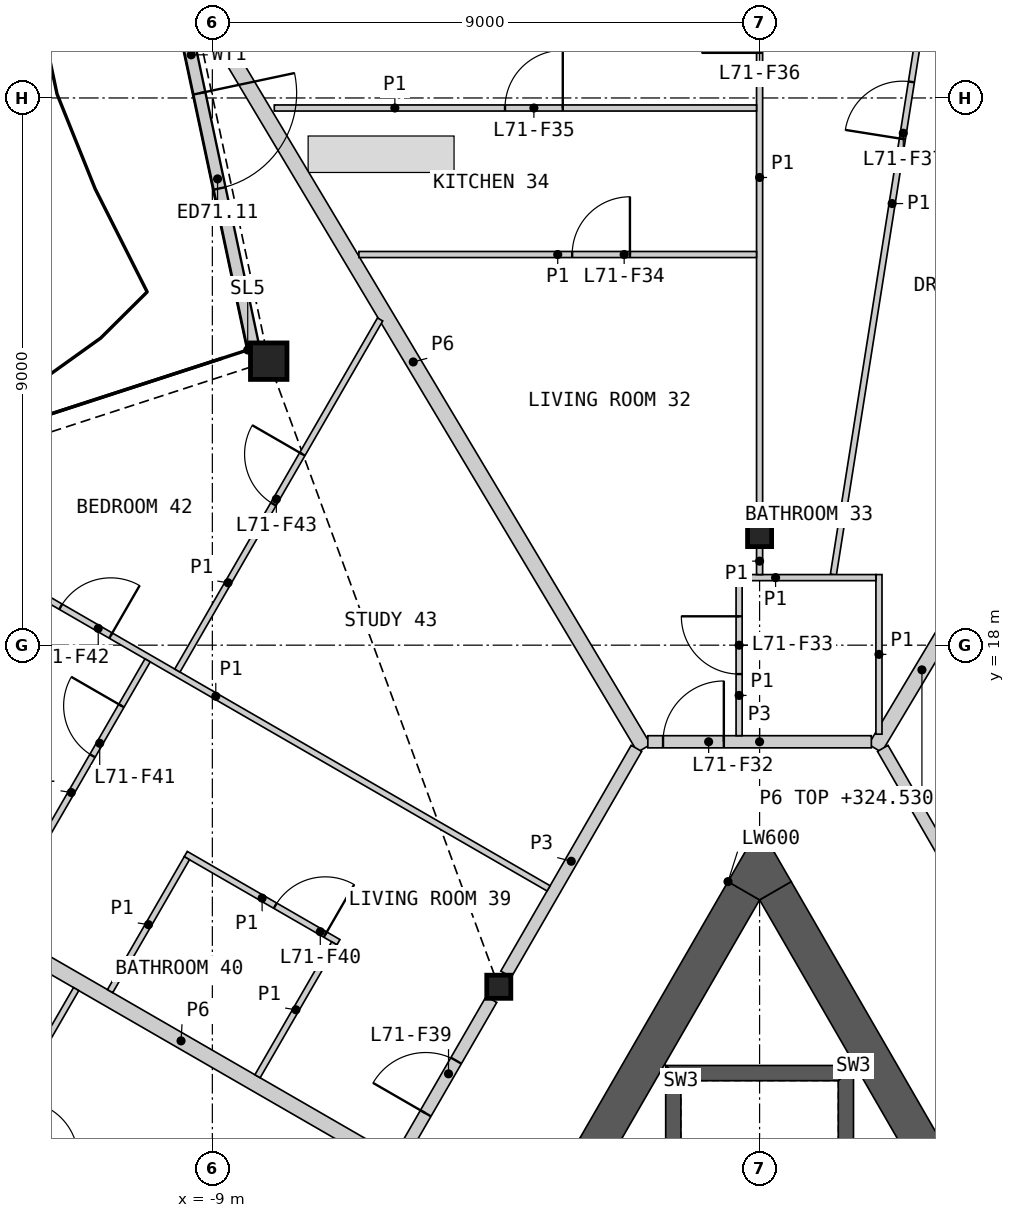
"""IFC4 building model, lengths in metres.
Left out: names, types, materials, properties, quantities, classifications, styles, units other than length and angle.
Written with IfcOpenShell. Run it as: python <this file> out.ifc"""

import sys

from ifc_helpers import new_model, si_unit, direction, frame, frame_2d, origin, origin_2d, place, context, subcontext, project, spatial, polyline, rectangle, hollow_rectangle, i_section, outline, extrude, element, fill, save


model = new_model("IFC4")
c1 = context("Model", 3, precision=1e-05, world=origin(), true_north=direction((0.0, 1.0)))
c2 = subcontext(c1, "Body", "Model", "MODEL_VIEW")
j1 = project(units=[si_unit("LENGTHUNIT", "METRE"), si_unit("PLANEANGLEUNIT", "RADIAN")], contexts=[c1])
p1 = place(None, origin())
s1 = spatial("IfcSite", under=j1, at=p1, CompositionType="ELEMENT")
p2 = place(p1, origin())
s2 = spatial("IfcBuilding", under=s1, at=p2, CompositionType="ELEMENT")
p3 = place(p2, frame((0.0, 0.0, 322.2)))
s3 = spatial("IfcBuildingStorey", under=s2, at=p3, CompositionType="ELEMENT", Elevation=322.2)
p4 = place(p3, frame((-8.073, 22.671, 0.0), z_axis=(0.0, 0.0, 1.0), x_axis=(1.0, 0.0, 0.0)))
e1 = element("IfcColumn", 1, at=p4, inside=s3, PredefinedType="COLUMN", context=c2, shape_type="SweptSolid", body=[
    extrude(hollow_rectangle(XDim=0.6, YDim=0.6, WallThickness=0.04, at=origin_2d()), origin(), (0.0, 0.0, 1.0), 3.4),
])
for number, where, z_axis, x_axis in (
    (2, (0.0, 19.811, 0.0), (0.0, 0.0, 1.0), (1.0, 0.0, 0.0)),
    (3, (-4.289, 12.382, 0.0), (0.0, 0.0, 1.0), (1.0, 0.0, 0.0)),
):
    element("IfcColumn", number, at=place(p3, frame(where, z_axis=z_axis, x_axis=x_axis)), inside=s3, PredefinedType="COLUMN", context=c2, shape_type="SweptSolid", body=[
        extrude(i_section(OverallWidth=0.396, OverallDepth=0.381, WebThickness=0.019, FlangeThickness=0.03, at=origin_2d()), origin(), (0.0, 0.0, 1.0), 3.4),
    ])
p5 = place(p3, frame((-9.684, 29.289, 0.0), z_axis=(0.0, 0.0, 1.0), x_axis=(0.207920686021, -0.978145688701, 0.0)))
e4 = element("IfcWall", 4, at=p5, inside=s3, PredefinedType="SOLIDWALL", context=c2, shape_type="SweptSolid", body=[
    extrude(rectangle(XDim=6.459, YDim=0.2, at=frame_2d((3.229, 0.0))), origin(), (0.0, 0.0, 1.0), 2.488),
])
p6 = place(p5, frame((2.261, 0.0, 0.0)))
e5 = element("IfcOpeningElement", 5, at=p6, cuts=e4, PredefinedType="OPENING", context=c2, shape_type="SweptSolid", body=[
    extrude(rectangle(XDim=1.6, YDim=2.25, at=frame_2d((0.8, 1.125))), frame((0.0, 0.11, 0.0), z_axis=(0.0, -1.0, 0.0), x_axis=(1.0, 0.0, 0.0)), (0.0, 0.0, 1.0), 0.22),
])
p7 = place(p3, origin())
e6 = element("IfcWall", 6, at=p7, inside=s3, PredefinedType="SHEAR", context=c2, shape_type="SweptSolid", body=[
    extrude(outline(polyline([(1.544, 5.237), (1.544, 11.087), (1.294, 10.837), (1.294, 5.237), (1.544, 5.237)])), origin(), (0.0, 0.0, 1.0), 3.1),
])
p8 = place(p3, origin())
e7 = element("IfcWall", 7, at=p8, inside=s3, PredefinedType="SHEAR", context=c2, shape_type="SweptSolid", body=[
    extrude(outline(polyline([(1.544, 11.087), (-1.544, 11.087), (-1.294, 10.837), (1.294, 10.837), (1.544, 11.087)])), origin(), (0.0, 0.0, 1.0), 3.1),
])
p9 = place(p3, origin())
e8 = element("IfcWall", 8, at=p9, inside=s3, PredefinedType="SHEAR", context=c2, shape_type="SweptSolid", body=[
    extrude(outline(polyline([(-1.294, 10.837), (-1.544, 11.087), (-1.544, 5.237), (-1.294, 5.237), (-1.294, 10.837)])), origin(), (0.0, 0.0, 1.0), 3.1),
])
p10 = place(p3, frame((8.686, -0.634, 0.0), z_axis=(0.0, 0.0, 1.0), x_axis=(-0.500004601921, 0.866022746848, 0.0)))
e9 = element("IfcWall", 9, at=p10, inside=s3, PredefinedType="SHEAR", context=c2, shape_type="SweptSolid", body=[
    extrude(rectangle(XDim=16.853, YDim=0.6, at=frame_2d((8.426, 0.0))), origin(), (0.0, 0.0, 1.0), 3.1),
])
p11 = place(p3, frame((-0.26, 13.961, 0.0), z_axis=(0.0, 0.0, 1.0), x_axis=(-0.50000604952, -0.866021911064, 0.0)))
e10 = element("IfcWall", 10, at=p11, inside=s3, PredefinedType="SHEAR", context=c2, shape_type="SweptSolid", body=[
    extrude(rectangle(XDim=4.869, YDim=0.6, at=frame_2d((2.434, 0.0))), origin(), (0.0, 0.0, 1.0), 3.1),
])
p12 = place(p3, origin())
e11 = element("IfcWall", 11, at=p12, inside=s3, PredefinedType="SHEAR", context=c2, shape_type="SweptSolid", body=[
    extrude(outline(polyline([(-0.52, 14.111), (0.0, 15.011), (0.52, 14.111), (0.0, 13.811), (-0.52, 14.111)])), origin(), (0.0, 0.0, 1.0), 3.1),
])
p13 = place(p3, frame((1.899, 16.304, 0.0), z_axis=(0.0, 0.0, 1.0), x_axis=(0.512977925681, 0.858401798556, 0.0)))
e12 = element("IfcWall", 12, at=p13, inside=s3, PredefinedType="PARTITIONING", context=c2, shape_type="SweptSolid", body=[
    extrude(rectangle(XDim=15.028, YDim=0.25, at=frame_2d((7.514, 0.0))), origin(), (0.0, 0.0, 1.0), 2.33),
])
p14 = place(p3, frame((-9.493, 29.012, 0.0), z_axis=(0.0, 0.0, 1.0), x_axis=(0.512967150926, -0.85840823742, 0.0)))
e13 = element("IfcWall", 13, at=p14, inside=s3, PredefinedType="PARTITIONING", context=c2, shape_type="SweptSolid", body=[
    extrude(rectangle(XDim=14.805, YDim=0.25, at=frame_2d((7.402, 0.0))), origin(), (0.0, 0.0, 1.0), 2.33),
])
p15 = place(p3, frame((-8.458, 5.16, 0.0), z_axis=(0.0, 0.0, 1.0), x_axis=(0.499984266882, 0.866034487114, 0.0)))
e14 = element("IfcWall", 14, at=p15, inside=s3, PredefinedType="PARTITIONING", context=c2, shape_type="SweptSolid", body=[
    extrude(rectangle(XDim=8.099, YDim=0.2, at=frame_2d((4.049, 0.0))), origin(), (0.0, 0.0, 1.0), 3.1),
])
p16 = place(p15, frame((5.935, 0.0, 0.0)))
e15 = element("IfcOpeningElement", 15, at=p16, cuts=e14, PredefinedType="OPENING", context=c2, shape_type="SweptSolid", body=[
    extrude(rectangle(XDim=1.0, YDim=2.1, at=frame_2d((0.5, 1.05))), frame((0.0, 0.11, 0.0), z_axis=(0.0, -1.0, 0.0), x_axis=(1.0, 0.0, 0.0)), (0.0, 0.0, 1.0), 0.22),
])
p17 = place(p15, frame((0.83, 0.0, 0.0)))
e16 = element("IfcOpeningElement", 16, at=p17, cuts=e14, PredefinedType="OPENING", context=c2, shape_type="SweptSolid", body=[
    extrude(rectangle(XDim=1.0, YDim=2.1, at=frame_2d((0.5, 1.05))), frame((0.0, 0.11, 0.0), z_axis=(0.0, -1.0, 0.0), x_axis=(1.0, 0.0, 0.0)), (0.0, 0.0, 1.0), 0.22),
])
p18 = place(p3, frame((-12.962, 13.482, 0.0), z_axis=(0.0, 0.0, 1.0), x_axis=(0.866022671543, -0.50000473235, 0.0)))
e17 = element("IfcWall", 17, at=p18, inside=s3, PredefinedType="PARTITIONING", context=c2, shape_type="SweptSolid", body=[
    extrude(rectangle(XDim=7.961, YDim=0.25, at=frame_2d((3.98, 0.0))), origin(), (0.0, 0.0, 1.0), 2.33),
])
for number, where, z_axis, x_axis in (
    (18, (2.025, 16.303, 0.0), (0.0, 0.0, 1.0), (0.5, -0.866, 0.0)),
    (19, (-4.169, 12.59, 0.0), (0.0, 0.0, 1.0), (0.5, 0.866, 0.0)),
):
    element("IfcWall", number, at=place(p3, frame(where, z_axis=z_axis, x_axis=x_axis)), inside=s3, PredefinedType="PARTITIONING", context=c2, shape_type="SweptSolid", body=[
        extrude(rectangle(XDim=4.288, YDim=0.2, at=frame_2d((2.144, 0.0))), origin(), (0.0, 0.0, 1.0), 3.1),
    ])
p19 = place(p3, frame((-1.838, 16.411, 0.0), z_axis=(0.0, 0.0, 1.0), x_axis=(1.0, 0.0, 0.0)))
e20 = element("IfcWall", 20, at=p19, inside=s3, PredefinedType="PARTITIONING", context=c2, shape_type="SweptSolid", body=[
    extrude(rectangle(XDim=3.676, YDim=0.2, at=frame_2d((1.838, 0.0))), origin(), (0.0, 0.0, 1.0), 3.1),
])
p20 = place(p19, frame((0.25, 0.0, 0.0)))
e21 = element("IfcOpeningElement", 21, at=p20, cuts=e20, PredefinedType="OPENING", context=c2, shape_type="SweptSolid", body=[
    extrude(rectangle(XDim=1.0, YDim=2.1, at=frame_2d((0.5, 1.05))), frame((0.0, 0.11, 0.0), z_axis=(0.0, -1.0, 0.0), x_axis=(1.0, 0.0, 0.0)), (0.0, 0.0, 1.0), 0.22),
])
p21 = place(p3, frame((-14.417, 20.32, 0.0), z_axis=(0.0, 0.0, 1.0), x_axis=(0.866021216079, -0.500007253249, 0.0)))
e22 = element("IfcWall", 22, at=p21, inside=s3, PredefinedType="PARTITIONING", context=c2, shape_type="SweptSolid", body=[
    extrude(rectangle(XDim=12.639, YDim=0.1, at=frame_2d((6.32, 0.0))), origin(), (0.0, 0.0, 1.0), 2.33),
])
p22 = place(p21, frame((3.375, 0.0, 0.0)))
e23 = element("IfcOpeningElement", 23, at=p22, cuts=e22, PredefinedType="OPENING", context=c2, shape_type="SweptSolid", body=[
    extrude(rectangle(XDim=0.95, YDim=2.1, at=frame_2d((0.475, 1.05))), frame((0.0, 0.06, 0.0), z_axis=(0.0, -1.0, 0.0), x_axis=(1.0, 0.0, 0.0)), (0.0, 0.0, 1.0), 0.12),
])
p23 = place(p3, frame((-19.615, 11.325, 0.0), z_axis=(0.0, 0.0, 1.0), x_axis=(0.86602139559, -0.500006942333, 0.0)))
e24 = element("IfcWall", 24, at=p23, inside=s3, PredefinedType="PARTITIONING", context=c2, shape_type="SweptSolid", body=[
    extrude(rectangle(XDim=12.505, YDim=0.1, at=frame_2d((6.252, 0.0))), origin(), (0.0, 0.0, 1.0), 2.33),
])
p24 = place(p23, frame((6.28, 0.0, 0.0)))
e25 = element("IfcOpeningElement", 25, at=p24, cuts=e24, PredefinedType="OPENING", context=c2, shape_type="SweptSolid", body=[
    extrude(rectangle(XDim=0.95, YDim=2.1, at=frame_2d((0.475, 1.05))), frame((0.0, 0.06, 0.0), z_axis=(0.0, -1.0, 0.0), x_axis=(1.0, 0.0, 0.0)), (0.0, 0.0, 1.0), 0.12),
])
p25 = place(p3, frame((1.213, 19.16, 0.0), z_axis=(0.0, 0.0, 1.0), x_axis=(0.156426176129, 0.987689653394, 0.0)))
e26 = element("IfcWall", 26, at=p25, inside=s3, PredefinedType="PARTITIONING", context=c2, shape_type="SweptSolid", body=[
    extrude(rectangle(XDim=12.358, YDim=0.1, at=frame_2d((6.179, 0.0))), origin(), (0.0, 0.0, 1.0), 2.33),
])
p26 = place(p25, frame((7.255, 0.0, 0.0)))
e27 = element("IfcOpeningElement", 27, at=p26, cuts=e26, PredefinedType="OPENING", context=c2, shape_type="SweptSolid", body=[
    extrude(rectangle(XDim=0.95, YDim=2.1, at=frame_2d((0.475, 1.05))), frame((0.0, 0.06, 0.0), z_axis=(0.0, -1.0, 0.0), x_axis=(1.0, 0.0, 0.0)), (0.0, 0.0, 1.0), 0.12),
])
p27 = place(p3, frame((0.0, 20.019, 0.0), z_axis=(0.0, 0.0, 1.0), x_axis=(0.0, 1.0, 0.0)))
e28 = element("IfcWall", 28, at=p27, inside=s3, PredefinedType="PARTITIONING", context=c2, shape_type="SweptSolid", body=[
    extrude(rectangle(XDim=11.347, YDim=0.1, at=frame_2d((5.674, 0.0))), origin(), (0.0, 0.0, 1.0), 2.33),
])
p28 = place(p27, frame((7.723, 0.0, 0.0)))
e29 = element("IfcOpeningElement", 29, at=p28, cuts=e28, PredefinedType="OPENING", context=c2, shape_type="SweptSolid", body=[
    extrude(rectangle(XDim=0.95, YDim=2.1, at=frame_2d((0.475, 1.05))), frame((0.0, 0.06, 0.0), z_axis=(0.0, -1.0, 0.0), x_axis=(1.0, 0.0, 0.0)), (0.0, 0.0, 1.0), 0.12),
])
p29 = place(p3, frame((-7.981, 26.835, 0.0), z_axis=(0.0, 0.0, 1.0), x_axis=(1.0, 0.0, 0.0)))
e30 = element("IfcWall", 30, at=p29, inside=s3, PredefinedType="PARTITIONING", context=c2, shape_type="SweptSolid", body=[
    extrude(rectangle(XDim=7.931, YDim=0.1, at=frame_2d((3.966, 0.0))), origin(), (0.0, 0.0, 1.0), 2.33),
])
p30 = place(p29, frame((3.794, 0.0, 0.0)))
e31 = element("IfcOpeningElement", 31, at=p30, cuts=e30, PredefinedType="OPENING", context=c2, shape_type="SweptSolid", body=[
    extrude(rectangle(XDim=0.95, YDim=2.1, at=frame_2d((0.475, 1.05))), frame((0.0, 0.06, 0.0), z_axis=(0.0, -1.0, 0.0), x_axis=(1.0, 0.0, 0.0)), (0.0, 0.0, 1.0), 0.12),
])
p31 = place(p3, frame((-9.575, 17.583, 0.0), z_axis=(0.0, 0.0, 1.0), x_axis=(0.499998189891, 0.866026448849, 0.0)))
e32 = element("IfcWall", 32, at=p31, inside=s3, PredefinedType="PARTITIONING", context=c2, shape_type="SweptSolid", body=[
    extrude(rectangle(XDim=6.668, YDim=0.1, at=frame_2d((3.334, 0.0))), origin(), (0.0, 0.0, 1.0), 2.33),
])
p32 = place(p31, frame((3.16, 0.0, 0.0)))
e33 = element("IfcOpeningElement", 33, at=p32, cuts=e32, PredefinedType="OPENING", context=c2, shape_type="SweptSolid", body=[
    extrude(rectangle(XDim=0.95, YDim=2.1, at=frame_2d((0.475, 1.05))), frame((0.0, 0.06, 0.0), z_axis=(0.0, -1.0, 0.0), x_axis=(1.0, 0.0, 0.0)), (0.0, 0.0, 1.0), 0.12),
])
p33 = place(p3, frame((-6.59, 24.425, 0.0), z_axis=(0.0, 0.0, 1.0), x_axis=(1.0, 0.0, 0.0)))
e34 = element("IfcWall", 34, at=p33, inside=s3, PredefinedType="PARTITIONING", context=c2, shape_type="SweptSolid", body=[
    extrude(rectangle(XDim=6.54, YDim=0.1, at=frame_2d((3.27, 0.0))), origin(), (0.0, 0.0, 1.0), 2.33),
])
p34 = place(p33, frame((3.508, 0.0, 0.0)))
e35 = element("IfcOpeningElement", 35, at=p34, cuts=e34, PredefinedType="OPENING", context=c2, shape_type="SweptSolid", body=[
    extrude(rectangle(XDim=0.95, YDim=2.1, at=frame_2d((0.475, 1.05))), frame((0.0, 0.06, 0.0), z_axis=(0.0, -1.0, 0.0), x_axis=(1.0, 0.0, 0.0)), (0.0, 0.0, 1.0), 0.12),
])
p35 = place(p3, frame((-12.721, 9.878, 0.0), z_axis=(0.0, 0.0, 1.0), x_axis=(0.866027751316, -0.499995933934, 0.0)))
e36 = element("IfcWall", 36, at=p35, inside=s3, PredefinedType="PARTITIONING", context=c2, shape_type="SweptSolid", body=[
    extrude(rectangle(XDim=5.95, YDim=0.1, at=frame_2d((2.975, 0.0))), origin(), (0.0, 0.0, 1.0), 2.33),
])
p36 = place(p35, frame((0.65, 0.0, 0.0)))
e37 = element("IfcOpeningElement", 37, at=p36, cuts=e36, PredefinedType="OPENING", context=c2, shape_type="SweptSolid", body=[
    extrude(rectangle(XDim=0.95, YDim=2.1, at=frame_2d((0.475, 1.05))), frame((0.0, 0.06, 0.0), z_axis=(0.0, -1.0, 0.0), x_axis=(1.0, 0.0, 0.0)), (0.0, 0.0, 1.0), 0.12),
])
p37 = place(p3, frame((2.361, 26.09, 0.0), z_axis=(0.0, 0.0, 1.0), x_axis=(1.0, 0.0, 0.0)))
e38 = element("IfcWall", 38, at=p37, inside=s3, PredefinedType="PARTITIONING", context=c2, shape_type="SweptSolid", body=[
    extrude(rectangle(XDim=5.19, YDim=0.1, at=frame_2d((2.595, 0.0))), origin(), (0.0, 0.0, 1.0), 2.33),
])
p38 = place(p37, frame((2.878, 0.0, 0.0)))
e39 = element("IfcOpeningElement", 39, at=p38, cuts=e38, PredefinedType="OPENING", context=c2, shape_type="SweptSolid", body=[
    extrude(rectangle(XDim=0.95, YDim=2.1, at=frame_2d((0.475, 1.05))), frame((0.0, 0.06, 0.0), z_axis=(0.0, -1.0, 0.0), x_axis=(1.0, 0.0, 0.0)), (0.0, 0.0, 1.0), 0.12),
])
p39 = place(p3, frame((-12.575, 13.403, 0.0), z_axis=(0.0, 0.0, 1.0), x_axis=(0.499989096993, 0.866031698547, 0.0)))
e40 = element("IfcWall", 40, at=p39, inside=s3, PredefinedType="PARTITIONING", context=c2, shape_type="SweptSolid", body=[
    extrude(rectangle(XDim=5.02, YDim=0.1, at=frame_2d((2.51, 0.0))), origin(), (0.0, 0.0, 1.0), 2.33),
])
p40 = place(p39, frame((3.208, 0.0, 0.0)))
e41 = element("IfcOpeningElement", 41, at=p40, cuts=e40, PredefinedType="OPENING", context=c2, shape_type="SweptSolid", body=[
    extrude(rectangle(XDim=0.95, YDim=2.1, at=frame_2d((0.475, 1.05))), frame((0.0, 0.06, 0.0), z_axis=(0.0, -1.0, 0.0), x_axis=(1.0, 0.0, 0.0)), (0.0, 0.0, 1.0), 0.12),
])
p41 = place(p3, frame((-12.652, 9.897, 0.0), z_axis=(0.0, 0.0, 1.0), x_axis=(0.500024172624, 0.866011447264, 0.0)))
e42 = element("IfcWall", 42, at=p41, inside=s3, PredefinedType="PARTITIONING", context=c2, shape_type="SweptSolid", body=[
    extrude(rectangle(XDim=2.825, YDim=0.1, at=frame_2d((1.413, 0.0))), origin(), (0.0, 0.0, 1.0), 2.33),
])
p42 = place(p3, frame((-9.438, 14.565, 0.0), z_axis=(0.0, 0.0, 1.0), x_axis=(0.866032775405, -0.499987231761, 0.0)))
e43 = element("IfcWall", 43, at=p42, inside=s3, PredefinedType="PARTITIONING", context=c2, shape_type="SweptSolid", body=[
    extrude(rectangle(XDim=2.9, YDim=0.1, at=frame_2d((1.45, 0.0))), origin(), (0.0, 0.0, 1.0), 2.33),
])
p43 = place(p42, frame((1.7, 0.0, 0.0)))
e44 = element("IfcOpeningElement", 44, at=p43, cuts=e43, PredefinedType="OPENING", context=c2, shape_type="SweptSolid", body=[
    extrude(rectangle(XDim=0.95, YDim=2.1, at=frame_2d((0.475, 1.05))), frame((0.0, 0.06, 0.0), z_axis=(0.0, -1.0, 0.0), x_axis=(1.0, 0.0, 0.0)), (0.0, 0.0, 1.0), 0.12),
])
p44 = place(p3, frame((-0.337, 16.511, 0.0), z_axis=(0.0, 0.0, 1.0), x_axis=(0.0, 1.0, 0.0)))
e45 = element("IfcWall", 45, at=p44, inside=s3, PredefinedType="PARTITIONING", context=c2, shape_type="SweptSolid", body=[
    extrude(rectangle(XDim=2.65, YDim=0.1, at=frame_2d((1.325, 0.0))), origin(), (0.0, 0.0, 1.0), 2.33),
])
p45 = place(p44, frame((1.014, 0.0, 0.0)))
e46 = element("IfcOpeningElement", 46, at=p45, cuts=e45, PredefinedType="OPENING", context=c2, shape_type="SweptSolid", body=[
    extrude(rectangle(XDim=0.95, YDim=2.1, at=frame_2d((0.475, 1.05))), frame((0.0, 0.06, 0.0), z_axis=(0.0, -1.0, 0.0), x_axis=(1.0, 0.0, 0.0)), (0.0, 0.0, 1.0), 0.12),
])
p46 = place(p3, frame((1.963, 16.536, 0.0), z_axis=(0.0, 0.0, 1.0), x_axis=(0.0, 1.0, 0.0)))
e47 = element("IfcWall", 47, at=p46, inside=s3, PredefinedType="PARTITIONING", context=c2, shape_type="SweptSolid", body=[
    extrude(rectangle(XDim=2.625, YDim=0.1, at=frame_2d((1.312, 0.0))), origin(), (0.0, 0.0, 1.0), 2.33),
])
for number, where, z_axis, x_axis in (
    (48, (-10.682, 12.31, 0.0), (0.0, 0.0, 1.0), (0.5, 0.866, 0.0)),
    (49, (-8.257, 10.91, 0.0), (0.0, 0.0, 1.0), (0.5, 0.866, 0.0)),
):
    element("IfcWall", number, at=place(p3, frame(where, z_axis=z_axis, x_axis=x_axis)), inside=s3, PredefinedType="PARTITIONING", context=c2, shape_type="SweptSolid", body=[
        extrude(rectangle(XDim=2.525, YDim=0.1, at=frame_2d((1.262, 0.0))), origin(), (0.0, 0.0, 1.0), 2.33),
    ])
p47 = place(p3, frame((-0.287, 19.111, 0.0), z_axis=(0.0, 0.0, 1.0), x_axis=(1.0, 0.0, 0.0)))
e50 = element("IfcWall", 50, at=p47, inside=s3, PredefinedType="PARTITIONING", context=c2, shape_type="SweptSolid", body=[
    extrude(rectangle(XDim=2.2, YDim=0.1, at=frame_2d((1.1, 0.0))), origin(), (0.0, 0.0, 1.0), 2.33),
])
p48 = place(p3, frame((0.0, 19.161, 0.0), z_axis=(0.0, 0.0, 1.0), x_axis=(0.0, 1.0, 0.0)))
e51 = element("IfcWall", 51, at=p48, inside=s3, PredefinedType="PARTITIONING", context=c2, shape_type="SweptSolid", body=[
    extrude(rectangle(XDim=0.442, YDim=0.1, at=frame_2d((0.221, 0.0))), origin(), (0.0, 0.0, 1.0), 2.33),
])
p49 = place(p6, origin())
e52 = element("IfcDoor", 52, at=p49, inside=s3, OperationType="DOUBLE_DOOR_SINGLE_SWING", PredefinedType="DOOR", context=c2, shape_type="SweptSolid", body=[
    extrude(rectangle(XDim=1.6, YDim=2.25, at=frame_2d((0.8, 1.125))), frame((0.0, 0.025, 0.0), z_axis=(0.0, -1.0, 0.0), x_axis=(1.0, 0.0, 0.0)), (0.0, 0.0, 1.0), 0.05),
])
fill(e5, e52)
p50 = place(p20, origin())
e53 = element("IfcDoor", 53, at=p50, inside=s3, OperationType="SINGLE_SWING_RIGHT", PredefinedType="DOOR", context=c2, shape_type="SweptSolid", body=[
    extrude(rectangle(XDim=1.0, YDim=2.1, at=frame_2d((0.5, 1.05))), frame((0.0, 0.025, 0.0), z_axis=(0.0, -1.0, 0.0), x_axis=(1.0, 0.0, 0.0)), (0.0, 0.0, 1.0), 0.05),
])
fill(e21, e53)
p51 = place(p45, origin())
e54 = element("IfcDoor", 54, at=p51, inside=s3, OperationType="SINGLE_SWING_RIGHT", PredefinedType="DOOR", context=c2, shape_type="SweptSolid", body=[
    extrude(rectangle(XDim=0.95, YDim=2.1, at=frame_2d((0.475, 1.05))), frame((0.0, 0.025, 0.0), z_axis=(0.0, -1.0, 0.0), x_axis=(1.0, 0.0, 0.0)), (0.0, 0.0, 1.0), 0.05),
])
fill(e46, e54)
p52 = place(p34, origin())
e55 = element("IfcDoor", 55, at=p52, inside=s3, OperationType="SINGLE_SWING_RIGHT", PredefinedType="DOOR", context=c2, shape_type="SweptSolid", body=[
    extrude(rectangle(XDim=0.95, YDim=2.1, at=frame_2d((0.475, 1.05))), frame((0.0, 0.025, 0.0), z_axis=(0.0, -1.0, 0.0), x_axis=(1.0, 0.0, 0.0)), (0.0, 0.0, 1.0), 0.05),
])
fill(e35, e55)
p53 = place(p30, origin())
e56 = element("IfcDoor", 56, at=p53, inside=s3, OperationType="SINGLE_SWING_RIGHT", PredefinedType="DOOR", context=c2, shape_type="SweptSolid", body=[
    extrude(rectangle(XDim=0.95, YDim=2.1, at=frame_2d((0.475, 1.05))), frame((0.0, 0.025, 0.0), z_axis=(0.0, -1.0, 0.0), x_axis=(1.0, 0.0, 0.0)), (0.0, 0.0, 1.0), 0.05),
])
fill(e31, e56)
p54 = place(p28, origin())
e57 = element("IfcDoor", 57, at=p54, inside=s3, OperationType="SINGLE_SWING_LEFT", PredefinedType="DOOR", context=c2, shape_type="SweptSolid", body=[
    extrude(rectangle(XDim=0.95, YDim=2.1, at=frame_2d((0.475, 1.05))), frame((0.0, 0.025, 0.0), z_axis=(0.0, -1.0, 0.0), x_axis=(1.0, 0.0, 0.0)), (0.0, 0.0, 1.0), 0.05),
])
fill(e29, e57)
p55 = place(p26, origin())
e58 = element("IfcDoor", 58, at=p55, inside=s3, OperationType="SINGLE_SWING_LEFT", PredefinedType="DOOR", context=c2, shape_type="SweptSolid", body=[
    extrude(rectangle(XDim=0.95, YDim=2.1, at=frame_2d((0.475, 1.05))), frame((0.0, 0.025, 0.0), z_axis=(0.0, -1.0, 0.0), x_axis=(1.0, 0.0, 0.0)), (0.0, 0.0, 1.0), 0.05),
])
fill(e27, e58)
p56 = place(p16, origin())
e59 = element("IfcDoor", 59, at=p56, inside=s3, OperationType="SINGLE_SWING_LEFT", PredefinedType="DOOR", context=c2, shape_type="SweptSolid", body=[
    extrude(rectangle(XDim=1.0, YDim=2.1, at=frame_2d((0.5, 1.05))), frame((0.0, 0.025, 0.0), z_axis=(0.0, -1.0, 0.0), x_axis=(1.0, 0.0, 0.0)), (0.0, 0.0, 1.0), 0.05),
])
fill(e15, e59)
p57 = place(p43, origin())
e60 = element("IfcDoor", 60, at=p57, inside=s3, OperationType="SINGLE_SWING_RIGHT", PredefinedType="DOOR", context=c2, shape_type="SweptSolid", body=[
    extrude(rectangle(XDim=0.95, YDim=2.1, at=frame_2d((0.475, 1.05))), frame((0.0, 0.025, 0.0), z_axis=(0.0, -1.0, 0.0), x_axis=(1.0, 0.0, 0.0)), (0.0, 0.0, 1.0), 0.05),
])
fill(e44, e60)
p58 = place(p40, origin())
e61 = element("IfcDoor", 61, at=p58, inside=s3, OperationType="SINGLE_SWING_RIGHT", PredefinedType="DOOR", context=c2, shape_type="SweptSolid", body=[
    extrude(rectangle(XDim=0.95, YDim=2.1, at=frame_2d((0.475, 1.05))), frame((0.0, 0.025, 0.0), z_axis=(0.0, -1.0, 0.0), x_axis=(1.0, 0.0, 0.0)), (0.0, 0.0, 1.0), 0.05),
])
fill(e41, e61)
p59 = place(p22, origin())
e62 = element("IfcDoor", 62, at=p59, inside=s3, OperationType="SINGLE_SWING_RIGHT", PredefinedType="DOOR", context=c2, shape_type="SweptSolid", body=[
    extrude(rectangle(XDim=0.95, YDim=2.1, at=frame_2d((0.475, 1.05))), frame((0.0, 0.025, 0.0), z_axis=(0.0, -1.0, 0.0), x_axis=(1.0, 0.0, 0.0)), (0.0, 0.0, 1.0), 0.05),
])
fill(e23, e62)
p60 = place(p32, origin())
e63 = element("IfcDoor", 63, at=p60, inside=s3, OperationType="SINGLE_SWING_RIGHT", PredefinedType="DOOR", context=c2, shape_type="SweptSolid", body=[
    extrude(rectangle(XDim=0.95, YDim=2.1, at=frame_2d((0.475, 1.05))), frame((0.0, 0.025, 0.0), z_axis=(0.0, -1.0, 0.0), x_axis=(1.0, 0.0, 0.0)), (0.0, 0.0, 1.0), 0.05),
])
fill(e33, e63)
save(model, sys.argv[1])
